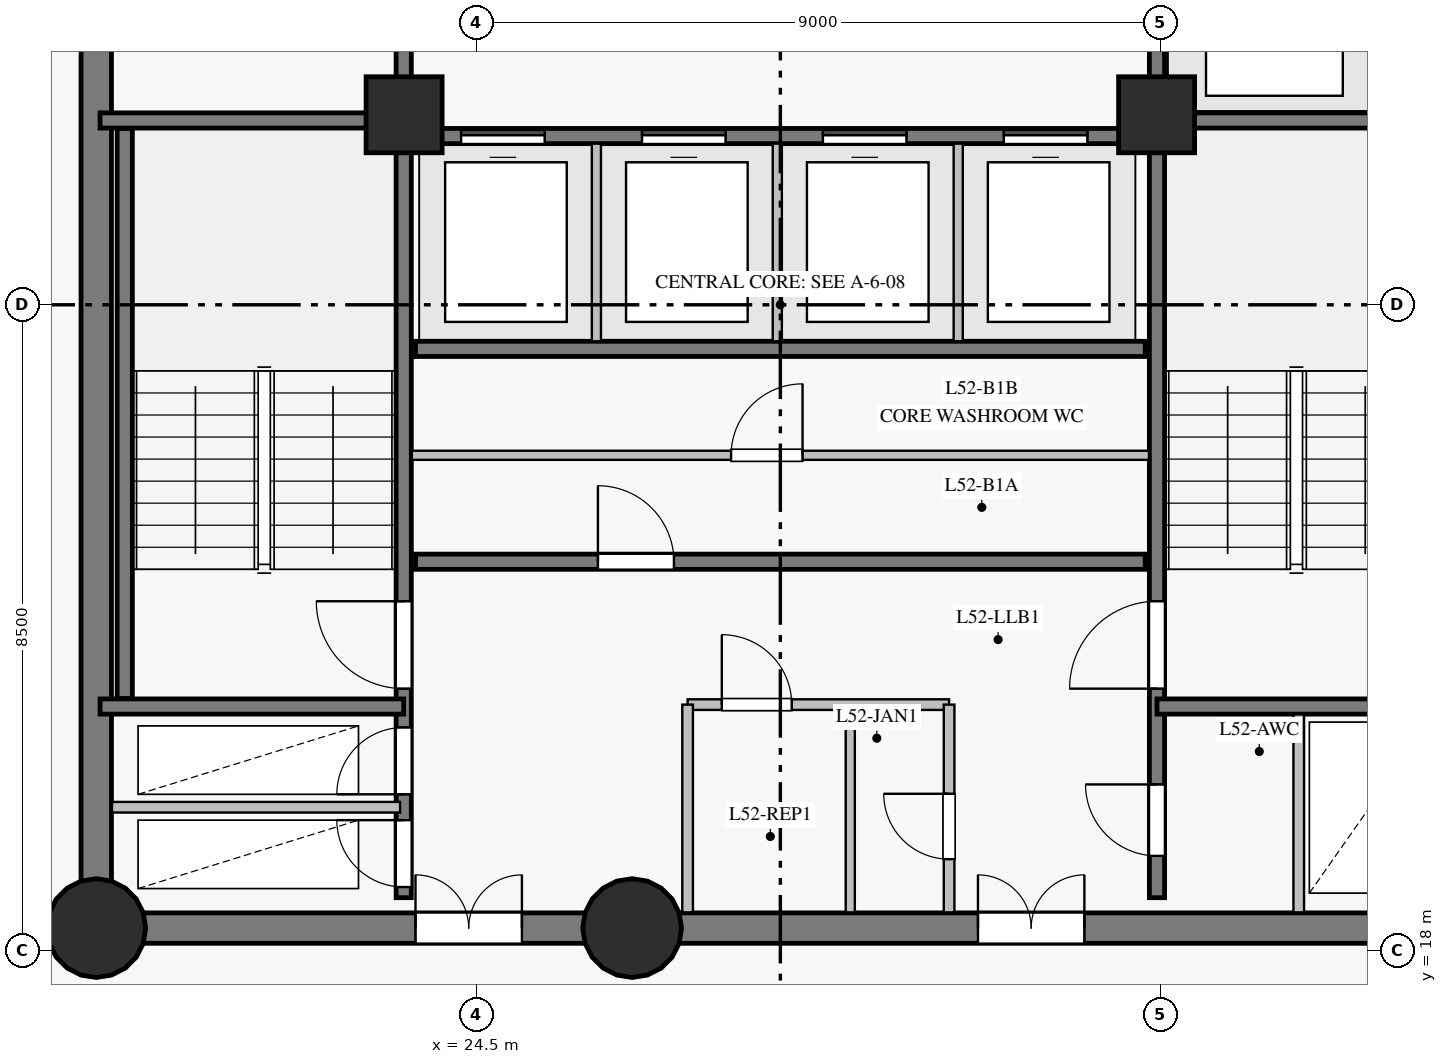
"""IFC4 building model, lengths in metres.
Left out: names, types, materials, properties, quantities, classifications, styles, units other than length and angle.
Written with IfcOpenShell. Run it as: python <this file> out.ifc"""

import sys

from ifc_helpers import new_model, si_unit, direction, frame, frame_2d, origin, origin_with_axes, origin_2d, place, context, subcontext, project, spatial, rectangle, circle, extrude, source, transform, mapped, element, fill, save


model = new_model("IFC4")
c1 = context("Model", 3, precision=1e-05, world=origin(), true_north=direction((0.0, 1.0)))
c2 = subcontext(c1, "Body", "Model", "MODEL_VIEW")
j1 = project(units=[si_unit("LENGTHUNIT", "METRE"), si_unit("PLANEANGLEUNIT", "RADIAN")], contexts=[c1])
p1 = place(None, origin())
s1 = spatial("IfcSite", under=j1, at=p1, CompositionType="ELEMENT")
p2 = place(p1, origin())
s2 = spatial("IfcBuilding", under=s1, at=p2, CompositionType="ELEMENT")
p3 = place(p2, frame((0.0, 0.0, 180.95)))
s3 = spatial("IfcBuildingStorey", under=s2, at=p3, CompositionType="ELEMENT", Elevation=180.95)
p4 = place(p3, frame((19.5, 18.3, 0.0), z_axis=(0.0, 0.0, 1.0), x_axis=(1.0, 0.0, 0.0)))
e1 = element("IfcWall", 1, at=p4, inside=s3, PredefinedType="SHEAR", context=c2, shape_type="SweptSolid", body=[
    extrude(rectangle(XDim=7.05, YDim=0.4, at=frame_2d((3.525, 0.0))), origin(), (0.0, 0.0, 1.0), 2.825),
])
p5 = place(p4, frame((4.2, 0.0, 0.0)))
e2 = element("IfcOpeningElement", 2, at=p5, cuts=e1, PredefinedType="OPENING", context=c2, shape_type="SweptSolid", body=[
    extrude(rectangle(XDim=1.4, YDim=2.2, at=frame_2d((0.7, 1.1))), frame((0.0, 0.21, 0.0), z_axis=(0.0, -1.0, 0.0), x_axis=(1.0, 0.0, 0.0)), (0.0, 0.0, 1.0), 0.42),
])
p6 = place(p3, frame((26.55, 18.3, 0.0), z_axis=(0.0, 0.0, 1.0), x_axis=(1.0, 0.0, 0.0)))
e3 = element("IfcWall", 3, at=p6, inside=s3, PredefinedType="SHEAR", context=c2, shape_type="SweptSolid", body=[
    extrude(rectangle(XDim=10.95, YDim=0.4, at=frame_2d((5.475, 0.0))), origin(), (0.0, 0.0, 1.0), 2.825),
])
p7 = place(p6, frame((4.55, 0.0, 0.0)))
e4 = element("IfcOpeningElement", 4, at=p7, cuts=e3, PredefinedType="OPENING", context=c2, shape_type="SweptSolid", body=[
    extrude(rectangle(XDim=1.4, YDim=2.2, at=frame_2d((0.7, 1.1))), frame((0.0, 0.21, 0.0), z_axis=(0.0, -1.0, 0.0), x_axis=(1.0, 0.0, 0.0)), (0.0, 0.0, 1.0), 0.42),
])
p8 = place(p3, frame((19.5, 34.7, 0.0), z_axis=(0.0, 0.0, 1.0), x_axis=(0.0, -1.0, 0.0)))
e5 = element("IfcWall", 5, at=p8, inside=s3, PredefinedType="SHEAR", context=c2, shape_type="SweptSolid", body=[
    extrude(rectangle(XDim=16.4, YDim=0.4, at=frame_2d((8.2, 0.0))), origin(), (0.0, 0.0, 1.0), 2.825),
])
p9 = place(p8, frame((3.1, 0.0, 0.0)))
e6 = element("IfcOpeningElement", 6, at=p9, cuts=e5, PredefinedType="OPENING", context=c2, shape_type="SweptSolid", body=[
    extrude(rectangle(XDim=1.1, YDim=2.15, at=frame_2d((0.55, 1.075))), frame((0.0, 0.21, 0.0), z_axis=(0.0, -1.0, 0.0), x_axis=(1.0, 0.0, 0.0)), (0.0, 0.0, 1.0), 0.42),
])
m1 = source(origin_with_axes(), c2, "Body", "SweptSolid", [
    extrude(circle(Radius=0.65, at=origin_2d()), origin(), (0.0, 0.0, 1.0), 3.05),
])
for number, where, z_axis, x_axis in (
    (7, (19.5, 18.3, 0.0), (0.0, 0.0, 1.0), (1.0, 0.0, 0.0)),
    (8, (26.55, 18.3, 0.0), (0.0, 0.0, 1.0), (1.0, 0.0, 0.0)),
):
    element("IfcColumn", number, at=place(p3, frame(where, z_axis=z_axis, x_axis=x_axis)), inside=s3, PredefinedType="COLUMN", context=c2, shape_type="MappedRepresentation", body=[
        mapped(m1, transform((0.0, 0.0, 0.0), scale=1.0)),
    ])
m2 = source(origin_with_axes(), c2, "Body", "SweptSolid", [
    extrude(rectangle(XDim=1.0, YDim=1.0, at=origin_2d()), origin(), (0.0, 0.0, 1.0), 3.05),
])
for number, where, z_axis, x_axis in (
    (9, (23.55, 29.0, 0.0), (0.0, 0.0, 1.0), (1.0, 0.0, 0.0)),
    (10, (33.45, 29.0, 0.0), (0.0, 0.0, 1.0), (1.0, 0.0, 0.0)),
):
    element("IfcColumn", number, at=place(p3, frame(where, z_axis=z_axis, x_axis=x_axis)), inside=s3, PredefinedType="COLUMN", context=c2, shape_type="MappedRepresentation", body=[
        mapped(m2, transform((0.0, 0.0, 0.0), scale=1.0)),
    ])
p10 = place(p3, frame((23.545, 18.7, 0.0), z_axis=(0.0, 0.0, 1.0), x_axis=(0.0, 1.0, 0.0)))
e11 = element("IfcWall", 11, at=p10, inside=s3, PredefinedType="SHEAR", context=c2, shape_type="SweptSolid", body=[
    extrude(rectangle(XDim=15.6, YDim=0.2, at=frame_2d((7.8, 0.0))), origin(), (0.0, 0.0, 1.0), 2.825),
])
p11 = place(p10, frame((2.75, 0.0, 0.0)))
e12 = element("IfcOpeningElement", 12, at=p11, cuts=e11, PredefinedType="OPENING", context=c2, shape_type="SweptSolid", body=[
    extrude(rectangle(XDim=1.15, YDim=2.15, at=frame_2d((0.575, 1.075))), frame((0.0, 0.11, 0.0), z_axis=(0.0, -1.0, 0.0), x_axis=(1.0, 0.0, 0.0)), (0.0, 0.0, 1.0), 0.22),
])
p12 = place(p10, frame((0.14, 0.0, 0.0)))
e13 = element("IfcOpeningElement", 13, at=p12, cuts=e11, PredefinedType="OPENING", context=c2, shape_type="SweptSolid", body=[
    extrude(rectangle(XDim=0.88, YDim=2.1, at=frame_2d((0.44, 1.05))), frame((0.0, 0.11, 0.0), z_axis=(0.0, -1.0, 0.0), x_axis=(1.0, 0.0, 0.0)), (0.0, 0.0, 1.0), 0.22),
])
p13 = place(p10, frame((1.36, 0.0, 0.0)))
e14 = element("IfcOpeningElement", 14, at=p13, cuts=e11, PredefinedType="OPENING", context=c2, shape_type="SweptSolid", body=[
    extrude(rectangle(XDim=0.88, YDim=2.1, at=frame_2d((0.44, 1.05))), frame((0.0, 0.11, 0.0), z_axis=(0.0, -1.0, 0.0), x_axis=(1.0, 0.0, 0.0)), (0.0, 0.0, 1.0), 0.22),
])
p14 = place(p10, frame((12.1, 0.0, 0.0)))
e15 = element("IfcOpeningElement", 15, at=p14, cuts=e11, PredefinedType="OPENING", context=c2, shape_type="SweptSolid", body=[
    extrude(rectangle(XDim=1.12, YDim=2.15, at=frame_2d((0.56, 1.075))), frame((0.0, 0.11, 0.0), z_axis=(0.0, -1.0, 0.0), x_axis=(1.0, 0.0, 0.0)), (0.0, 0.0, 1.0), 0.22),
])
p15 = place(p10, frame((14.05, 0.0, 0.0)))
e16 = element("IfcOpeningElement", 16, at=p15, cuts=e11, PredefinedType="OPENING", context=c2, shape_type="SweptSolid", body=[
    extrude(rectangle(XDim=1.12, YDim=2.15, at=frame_2d((0.56, 1.075))), frame((0.0, 0.11, 0.0), z_axis=(0.0, -1.0, 0.0), x_axis=(1.0, 0.0, 0.0)), (0.0, 0.0, 1.0), 0.22),
])
p16 = place(p3, frame((33.455, 18.7, 0.0), z_axis=(0.0, 0.0, 1.0), x_axis=(0.0, 1.0, 0.0)))
e17 = element("IfcWall", 17, at=p16, inside=s3, PredefinedType="SHEAR", context=c2, shape_type="SweptSolid", body=[
    extrude(rectangle(XDim=15.6, YDim=0.2, at=frame_2d((7.8, 0.0))), origin(), (0.0, 0.0, 1.0), 2.825),
])
p17 = place(p16, frame((2.75, 0.0, 0.0)))
e18 = element("IfcOpeningElement", 18, at=p17, cuts=e17, PredefinedType="OPENING", context=c2, shape_type="SweptSolid", body=[
    extrude(rectangle(XDim=1.15, YDim=2.15, at=frame_2d((0.575, 1.075))), frame((0.0, 0.11, 0.0), z_axis=(0.0, -1.0, 0.0), x_axis=(1.0, 0.0, 0.0)), (0.0, 0.0, 1.0), 0.22),
])
p18 = place(p16, frame((0.55, 0.0, 0.0)))
e19 = element("IfcOpeningElement", 19, at=p18, cuts=e17, PredefinedType="OPENING", context=c2, shape_type="SweptSolid", body=[
    extrude(rectangle(XDim=0.94, YDim=2.1, at=frame_2d((0.47, 1.05))), frame((0.0, 0.11, 0.0), z_axis=(0.0, -1.0, 0.0), x_axis=(1.0, 0.0, 0.0)), (0.0, 0.0, 1.0), 0.22),
])
p19 = place(p3, frame((23.7, 23.12, 0.0), z_axis=(0.0, 0.0, 1.0), x_axis=(1.0, 0.0, 0.0)))
e20 = element("IfcWall", 20, at=p19, inside=s3, PredefinedType="SHEAR", context=c2, shape_type="SweptSolid", body=[
    extrude(rectangle(XDim=9.6, YDim=0.2, at=frame_2d((4.8, 0.0))), origin(), (0.0, 0.0, 1.0), 2.825),
])
p20 = place(p19, frame((2.4, 0.0, 0.0)))
e21 = element("IfcOpeningElement", 21, at=p20, cuts=e20, PredefinedType="OPENING", context=c2, shape_type="SweptSolid", body=[
    extrude(rectangle(XDim=1.0, YDim=2.15, at=frame_2d((0.5, 1.075))), frame((0.0, 0.11, 0.0), z_axis=(0.0, -1.0, 0.0), x_axis=(1.0, 0.0, 0.0)), (0.0, 0.0, 1.0), 0.22),
])
p21 = place(p3, frame((23.7, 25.92, 0.0), z_axis=(0.0, 0.0, 1.0), x_axis=(1.0, 0.0, 0.0)))
e22 = element("IfcWall", 22, at=p21, inside=s3, PredefinedType="SHEAR", context=c2, shape_type="SweptSolid", body=[
    extrude(rectangle(XDim=9.6, YDim=0.2, at=frame_2d((4.8, 0.0))), origin(), (0.0, 0.0, 1.0), 2.825),
])
p22 = place(p3, frame((23.7, 28.72, 0.0), z_axis=(0.0, 0.0, 1.0), x_axis=(1.0, 0.0, 0.0)))
e23 = element("IfcWall", 23, at=p22, inside=s3, PredefinedType="SHEAR", context=c2, shape_type="SweptSolid", body=[
    extrude(rectangle(XDim=9.6, YDim=0.2, at=frame_2d((4.8, 0.0))), origin(), (0.0, 0.0, 1.0), 2.825),
])
p23 = place(p22, frame((0.6, 0.0, 0.0)))
e24 = element("IfcOpeningElement", 24, at=p23, cuts=e23, PredefinedType="OPENING", context=c2, shape_type="SweptSolid", body=[
    extrude(rectangle(XDim=1.1, YDim=2.15, at=frame_2d((0.55, 1.075))), frame((0.0, 0.11, 0.0), z_axis=(0.0, -1.0, 0.0), x_axis=(1.0, 0.0, 0.0)), (0.0, 0.0, 1.0), 0.22),
])
p24 = place(p22, frame((2.98, 0.0, 0.0)))
e25 = element("IfcOpeningElement", 25, at=p24, cuts=e23, PredefinedType="OPENING", context=c2, shape_type="SweptSolid", body=[
    extrude(rectangle(XDim=1.1, YDim=2.15, at=frame_2d((0.55, 1.075))), frame((0.0, 0.11, 0.0), z_axis=(0.0, -1.0, 0.0), x_axis=(1.0, 0.0, 0.0)), (0.0, 0.0, 1.0), 0.22),
])
p25 = place(p22, frame((5.36, 0.0, 0.0)))
e26 = element("IfcOpeningElement", 26, at=p25, cuts=e23, PredefinedType="OPENING", context=c2, shape_type="SweptSolid", body=[
    extrude(rectangle(XDim=1.1, YDim=2.15, at=frame_2d((0.55, 1.075))), frame((0.0, 0.11, 0.0), z_axis=(0.0, -1.0, 0.0), x_axis=(1.0, 0.0, 0.0)), (0.0, 0.0, 1.0), 0.22),
])
p26 = place(p22, frame((7.74, 0.0, 0.0)))
e27 = element("IfcOpeningElement", 27, at=p26, cuts=e23, PredefinedType="OPENING", context=c2, shape_type="SweptSolid", body=[
    extrude(rectangle(XDim=1.1, YDim=2.15, at=frame_2d((0.55, 1.075))), frame((0.0, 0.11, 0.0), z_axis=(0.0, -1.0, 0.0), x_axis=(1.0, 0.0, 0.0)), (0.0, 0.0, 1.0), 0.22),
])
p27 = place(p3, frame((19.875, 21.32, 0.0), z_axis=(0.0, 0.0, 1.0), x_axis=(0.0, 1.0, 0.0)))
e28 = element("IfcWall", 28, at=p27, inside=s3, PredefinedType="SHEAR", context=c2, shape_type="SweptSolid", body=[
    extrude(rectangle(XDim=7.5, YDim=0.2, at=frame_2d((3.75, 0.0))), origin(), (0.0, 0.0, 1.0), 2.825),
])
for number, where, z_axis, x_axis in (
    (29, (33.455, 21.215, 0.0), (0.0, 0.0, 1.0), (1.0, 0.0, 0.0)),
    (30, (33.455, 28.925, 0.0), (0.0, 0.0, 1.0), (1.0, 0.0, 0.0)),
    (31, (19.55, 21.215, 0.0), (0.0, 0.0, 1.0), (1.0, 0.0, 0.0)),
    (32, (19.55, 28.925, 0.0), (0.0, 0.0, 1.0), (1.0, 0.0, 0.0)),
):
    element("IfcWall", number, at=place(p3, frame(where, z_axis=z_axis, x_axis=x_axis)), inside=s3, PredefinedType="SHEAR", context=c2, shape_type="SweptSolid", body=[
        extrude(rectangle(XDim=3.995, YDim=0.2, at=frame_2d((1.998, 0.0))), origin(), (0.0, 0.0, 1.0), 2.825),
    ])
p28 = place(p3, frame((23.652, 24.52, 0.0), z_axis=(0.0, 0.0, 1.0), x_axis=(1.0, 0.0, 0.0)))
e33 = element("IfcWall", 33, at=p28, inside=s3, PredefinedType="PARTITIONING", context=c2, shape_type="SweptSolid", body=[
    extrude(rectangle(XDim=9.698, YDim=0.12, at=frame_2d((4.849, 0.0))), origin(), (0.0, 0.0, 1.0), 2.825),
])
p29 = place(p28, frame((4.2, 0.0, 0.0)))
e34 = element("IfcOpeningElement", 34, at=p29, cuts=e33, PredefinedType="OPENING", context=c2, shape_type="SweptSolid", body=[
    extrude(rectangle(XDim=0.94, YDim=2.1, at=frame_2d((0.47, 1.05))), frame((0.0, 0.07, 0.0), z_axis=(0.0, -1.0, 0.0), x_axis=(1.0, 0.0, 0.0)), (0.0, 0.0, 1.0), 0.14),
])
p30 = place(p3, frame((19.707, 19.89, 0.0), z_axis=(0.0, 0.0, 1.0), x_axis=(1.0, 0.0, 0.0)))
e35 = element("IfcWall", 35, at=p30, inside=s3, PredefinedType="PARTITIONING", context=c2, shape_type="SweptSolid", body=[
    extrude(rectangle(XDim=3.79, YDim=0.14, at=frame_2d((1.895, 0.0))), origin(), (0.0, 0.0, 1.0), 2.825),
])
p31 = place(p3, frame((27.28, 21.24, 0.0), z_axis=(0.0, 0.0, 1.0), x_axis=(1.0, 0.0, 0.0)))
e36 = element("IfcWall", 36, at=p31, inside=s3, PredefinedType="PARTITIONING", context=c2, shape_type="SweptSolid", body=[
    extrude(rectangle(XDim=3.44, YDim=0.14, at=frame_2d((1.72, 0.0))), origin(), (0.0, 0.0, 1.0), 2.825),
])
p32 = place(p31, frame((0.45, 0.0, 0.0)))
e37 = element("IfcOpeningElement", 37, at=p32, cuts=e36, PredefinedType="OPENING", context=c2, shape_type="SweptSolid", body=[
    extrude(rectangle(XDim=0.92, YDim=2.1, at=frame_2d((0.46, 1.05))), frame((0.0, 0.08, 0.0), z_axis=(0.0, -1.0, 0.0), x_axis=(1.0, 0.0, 0.0)), (0.0, 0.0, 1.0), 0.16),
])
p33 = place(p3, frame((27.28, 18.507, 0.0), z_axis=(0.0, 0.0, 1.0), x_axis=(0.0, 1.0, 0.0)))
e38 = element("IfcWall", 38, at=p33, inside=s3, PredefinedType="PARTITIONING", context=c2, shape_type="SweptSolid", body=[
    extrude(rectangle(XDim=2.733, YDim=0.14, at=frame_2d((1.366, 0.0))), origin(), (0.0, 0.0, 1.0), 2.825),
])
p34 = place(p3, frame((30.72, 18.507, 0.0), z_axis=(0.0, 0.0, 1.0), x_axis=(0.0, 1.0, 0.0)))
e39 = element("IfcWall", 39, at=p34, inside=s3, PredefinedType="PARTITIONING", context=c2, shape_type="SweptSolid", body=[
    extrude(rectangle(XDim=2.733, YDim=0.14, at=frame_2d((1.366, 0.0))), origin(), (0.0, 0.0, 1.0), 2.825),
])
p35 = place(p34, frame((0.7, 0.0, 0.0)))
e40 = element("IfcOpeningElement", 40, at=p35, cuts=e39, PredefinedType="OPENING", context=c2, shape_type="SweptSolid", body=[
    extrude(rectangle(XDim=0.86, YDim=2.1, at=frame_2d((0.43, 1.05))), frame((0.0, 0.08, 0.0), z_axis=(0.0, -1.0, 0.0), x_axis=(1.0, 0.0, 0.0)), (0.0, 0.0, 1.0), 0.16),
])
for number, where, z_axis, x_axis in (
    (41, (26.08, 26.02, 0.0), (0.0, 0.0, 1.0), (0.0, 1.0, 0.0)),
    (42, (28.46, 26.02, 0.0), (0.0, 0.0, 1.0), (0.0, 1.0, 0.0)),
    (43, (30.84, 26.02, 0.0), (0.0, 0.0, 1.0), (0.0, 1.0, 0.0)),
):
    element("IfcWall", number, at=place(p3, frame(where, z_axis=z_axis, x_axis=x_axis)), inside=s3, PredefinedType="PARTITIONING", context=c2, shape_type="SweptSolid", body=[
        extrude(rectangle(XDim=2.6, YDim=0.12, at=frame_2d((1.3, 0.0))), origin(), (0.0, 0.0, 1.0), 2.825),
    ])
p36 = place(p3, frame((29.42, 18.507, 0.0), z_axis=(0.0, 0.0, 1.0), x_axis=(0.0, 1.0, 0.0)))
e44 = element("IfcWall", 44, at=p36, inside=s3, PredefinedType="PARTITIONING", context=c2, shape_type="SweptSolid", body=[
    extrude(rectangle(XDim=2.662, YDim=0.12, at=frame_2d((1.331, 0.0))), origin(), (0.0, 0.0, 1.0), 2.825),
])
p37 = place(p3, frame((35.32, 18.507, 0.0), z_axis=(0.0, 0.0, 1.0), x_axis=(0.0, 1.0, 0.0)))
e45 = element("IfcWall", 45, at=p37, inside=s3, PredefinedType="PARTITIONING", context=c2, shape_type="SweptSolid", body=[
    extrude(rectangle(XDim=2.604, YDim=0.14, at=frame_2d((1.302, 0.0))), origin(), (0.0, 0.0, 1.0), 2.825),
])
m3 = source(origin_with_axes(), c2, "Body", "SweptSolid", [
    extrude(rectangle(XDim=1.15, YDim=2.15, at=frame_2d((0.575, 1.075))), frame((0.0, 0.025, 0.0), z_axis=(0.0, -1.0, 0.0), x_axis=(1.0, 0.0, 0.0)), (0.0, 0.0, 1.0), 0.05),
])
p38 = place(p11, origin())
e46 = element("IfcDoor", 46, at=p38, inside=s3, OperationType="SINGLE_SWING_RIGHT", PredefinedType="DOOR", context=c2, shape_type="MappedRepresentation", body=[
    mapped(m3, transform((0.0, 0.0, 0.0), scale=1.0)),
])
fill(e12, e46)
p39 = place(p17, origin())
e47 = element("IfcDoor", 47, at=p39, inside=s3, OperationType="SINGLE_SWING_LEFT", PredefinedType="DOOR", context=c2, shape_type="MappedRepresentation", body=[
    mapped(m3, transform((0.0, 0.0, 0.0), scale=1.0)),
])
fill(e18, e47)
m4 = source(origin_with_axes(), c2, "Body", "SweptSolid", [
    extrude(rectangle(XDim=0.88, YDim=2.1, at=frame_2d((0.44, 1.05))), frame((0.0, 0.025, 0.0), z_axis=(0.0, -1.0, 0.0), x_axis=(1.0, 0.0, 0.0)), (0.0, 0.0, 1.0), 0.05),
])
p40 = place(p12, origin())
e48 = element("IfcDoor", 48, at=p40, inside=s3, OperationType="SINGLE_SWING_RIGHT", PredefinedType="DOOR", context=c2, shape_type="MappedRepresentation", body=[
    mapped(m4, transform((0.0, 0.0, 0.0), scale=1.0)),
])
fill(e13, e48)
p41 = place(p13, origin())
e49 = element("IfcDoor", 49, at=p41, inside=s3, OperationType="SINGLE_SWING_LEFT", PredefinedType="DOOR", context=c2, shape_type="MappedRepresentation", body=[
    mapped(m4, transform((0.0, 0.0, 0.0), scale=1.0)),
])
fill(e14, e49)
m5 = source(origin_with_axes(), c2, "Body", "SweptSolid", [
    extrude(rectangle(XDim=1.4, YDim=2.2, at=frame_2d((0.7, 1.1))), frame((0.0, 0.025, 0.0), z_axis=(0.0, -1.0, 0.0), x_axis=(1.0, 0.0, 0.0)), (0.0, 0.0, 1.0), 0.05),
])
p42 = place(p5, origin())
e50 = element("IfcDoor", 50, at=p42, inside=s3, OperationType="DOUBLE_DOOR_SINGLE_SWING", PredefinedType="DOOR", context=c2, shape_type="MappedRepresentation", body=[
    mapped(m5, transform((0.0, 0.0, 0.0), scale=1.0)),
])
fill(e2, e50)
p43 = place(p7, origin())
e51 = element("IfcDoor", 51, at=p43, inside=s3, OperationType="DOUBLE_DOOR_SINGLE_SWING", PredefinedType="DOOR", context=c2, shape_type="MappedRepresentation", body=[
    mapped(m5, transform((0.0, 0.0, 0.0), scale=1.0)),
])
fill(e4, e51)
m6 = source(origin_with_axes(), c2, "Body", "SweptSolid", [
    extrude(rectangle(XDim=0.94, YDim=2.1, at=frame_2d((0.47, 1.05))), frame((0.0, 0.025, 0.0), z_axis=(0.0, -1.0, 0.0), x_axis=(1.0, 0.0, 0.0)), (0.0, 0.0, 1.0), 0.05),
])
p44 = place(p18, origin())
e52 = element("IfcDoor", 52, at=p44, inside=s3, OperationType="SINGLE_SWING_RIGHT", PredefinedType="DOOR", context=c2, shape_type="MappedRepresentation", body=[
    mapped(m6, transform((0.0, 0.0, 0.0), scale=1.0)),
])
fill(e19, e52)
m7 = source(origin_with_axes(), c2, "Body", "SweptSolid", [
    extrude(rectangle(XDim=0.92, YDim=2.1, at=frame_2d((0.46, 1.05))), frame((0.0, 0.025, 0.0), z_axis=(0.0, -1.0, 0.0), x_axis=(1.0, 0.0, 0.0)), (0.0, 0.0, 1.0), 0.05),
])
p45 = place(p32, origin())
e53 = element("IfcDoor", 53, at=p45, inside=s3, OperationType="SINGLE_SWING_LEFT", PredefinedType="DOOR", context=c2, shape_type="MappedRepresentation", body=[
    mapped(m7, transform((0.0, 0.0, 0.0), scale=1.0)),
])
fill(e37, e53)
m8 = source(origin_with_axes(), c2, "Body", "SweptSolid", [
    extrude(rectangle(XDim=0.86, YDim=2.1, at=frame_2d((0.43, 1.05))), frame((0.0, 0.025, 0.0), z_axis=(0.0, -1.0, 0.0), x_axis=(1.0, 0.0, 0.0)), (0.0, 0.0, 1.0), 0.05),
])
p46 = place(p35, origin())
e54 = element("IfcDoor", 54, at=p46, inside=s3, OperationType="SINGLE_SWING_RIGHT", PredefinedType="DOOR", context=c2, shape_type="MappedRepresentation", body=[
    mapped(m8, transform((0.0, 0.0, 0.0), scale=1.0)),
])
fill(e40, e54)
m9 = source(origin_with_axes(), c2, "Body", "SweptSolid", [
    extrude(rectangle(XDim=1.0, YDim=2.15, at=frame_2d((0.5, 1.075))), frame((0.0, 0.025, 0.0), z_axis=(0.0, -1.0, 0.0), x_axis=(1.0, 0.0, 0.0)), (0.0, 0.0, 1.0), 0.05),
])
p47 = place(p20, origin())
e55 = element("IfcDoor", 55, at=p47, inside=s3, OperationType="SINGLE_SWING_LEFT", PredefinedType="DOOR", context=c2, shape_type="MappedRepresentation", body=[
    mapped(m9, transform((0.0, 0.0, 0.0), scale=1.0)),
])
fill(e21, e55)
p48 = place(p29, origin())
e56 = element("IfcDoor", 56, at=p48, inside=s3, OperationType="SINGLE_SWING_RIGHT", PredefinedType="DOOR", context=c2, shape_type="MappedRepresentation", body=[
    mapped(m6, transform((0.0, 0.0, 0.0), scale=1.0)),
])
fill(e34, e56)
m10 = source(origin_with_axes(), c2, "Body", "SweptSolid", [
    extrude(rectangle(XDim=1.1, YDim=2.15, at=frame_2d((0.55, 1.075))), frame((0.0, 0.025, 0.0), z_axis=(0.0, -1.0, 0.0), x_axis=(1.0, 0.0, 0.0)), (0.0, 0.0, 1.0), 0.05),
])
p49 = place(p23, origin())
e57 = element("IfcDoor", 57, at=p49, inside=s3, OperationType="SLIDING_TO_LEFT", PredefinedType="DOOR", context=c2, shape_type="MappedRepresentation", body=[
    mapped(m10, transform((0.0, 0.0, 0.0), scale=1.0)),
])
fill(e24, e57)
p50 = place(p24, origin())
e58 = element("IfcDoor", 58, at=p50, inside=s3, OperationType="SLIDING_TO_RIGHT", PredefinedType="DOOR", context=c2, shape_type="MappedRepresentation", body=[
    mapped(m10, transform((0.0, 0.0, 0.0), scale=1.0)),
])
fill(e25, e58)
p51 = place(p25, origin())
e59 = element("IfcDoor", 59, at=p51, inside=s3, OperationType="SLIDING_TO_LEFT", PredefinedType="DOOR", context=c2, shape_type="MappedRepresentation", body=[
    mapped(m10, transform((0.0, 0.0, 0.0), scale=1.0)),
])
fill(e26, e59)
p52 = place(p26, origin())
e60 = element("IfcDoor", 60, at=p52, inside=s3, OperationType="SLIDING_TO_RIGHT", PredefinedType="DOOR", context=c2, shape_type="MappedRepresentation", body=[
    mapped(m10, transform((0.0, 0.0, 0.0), scale=1.0)),
])
fill(e27, e60)
save(model, sys.argv[1])
